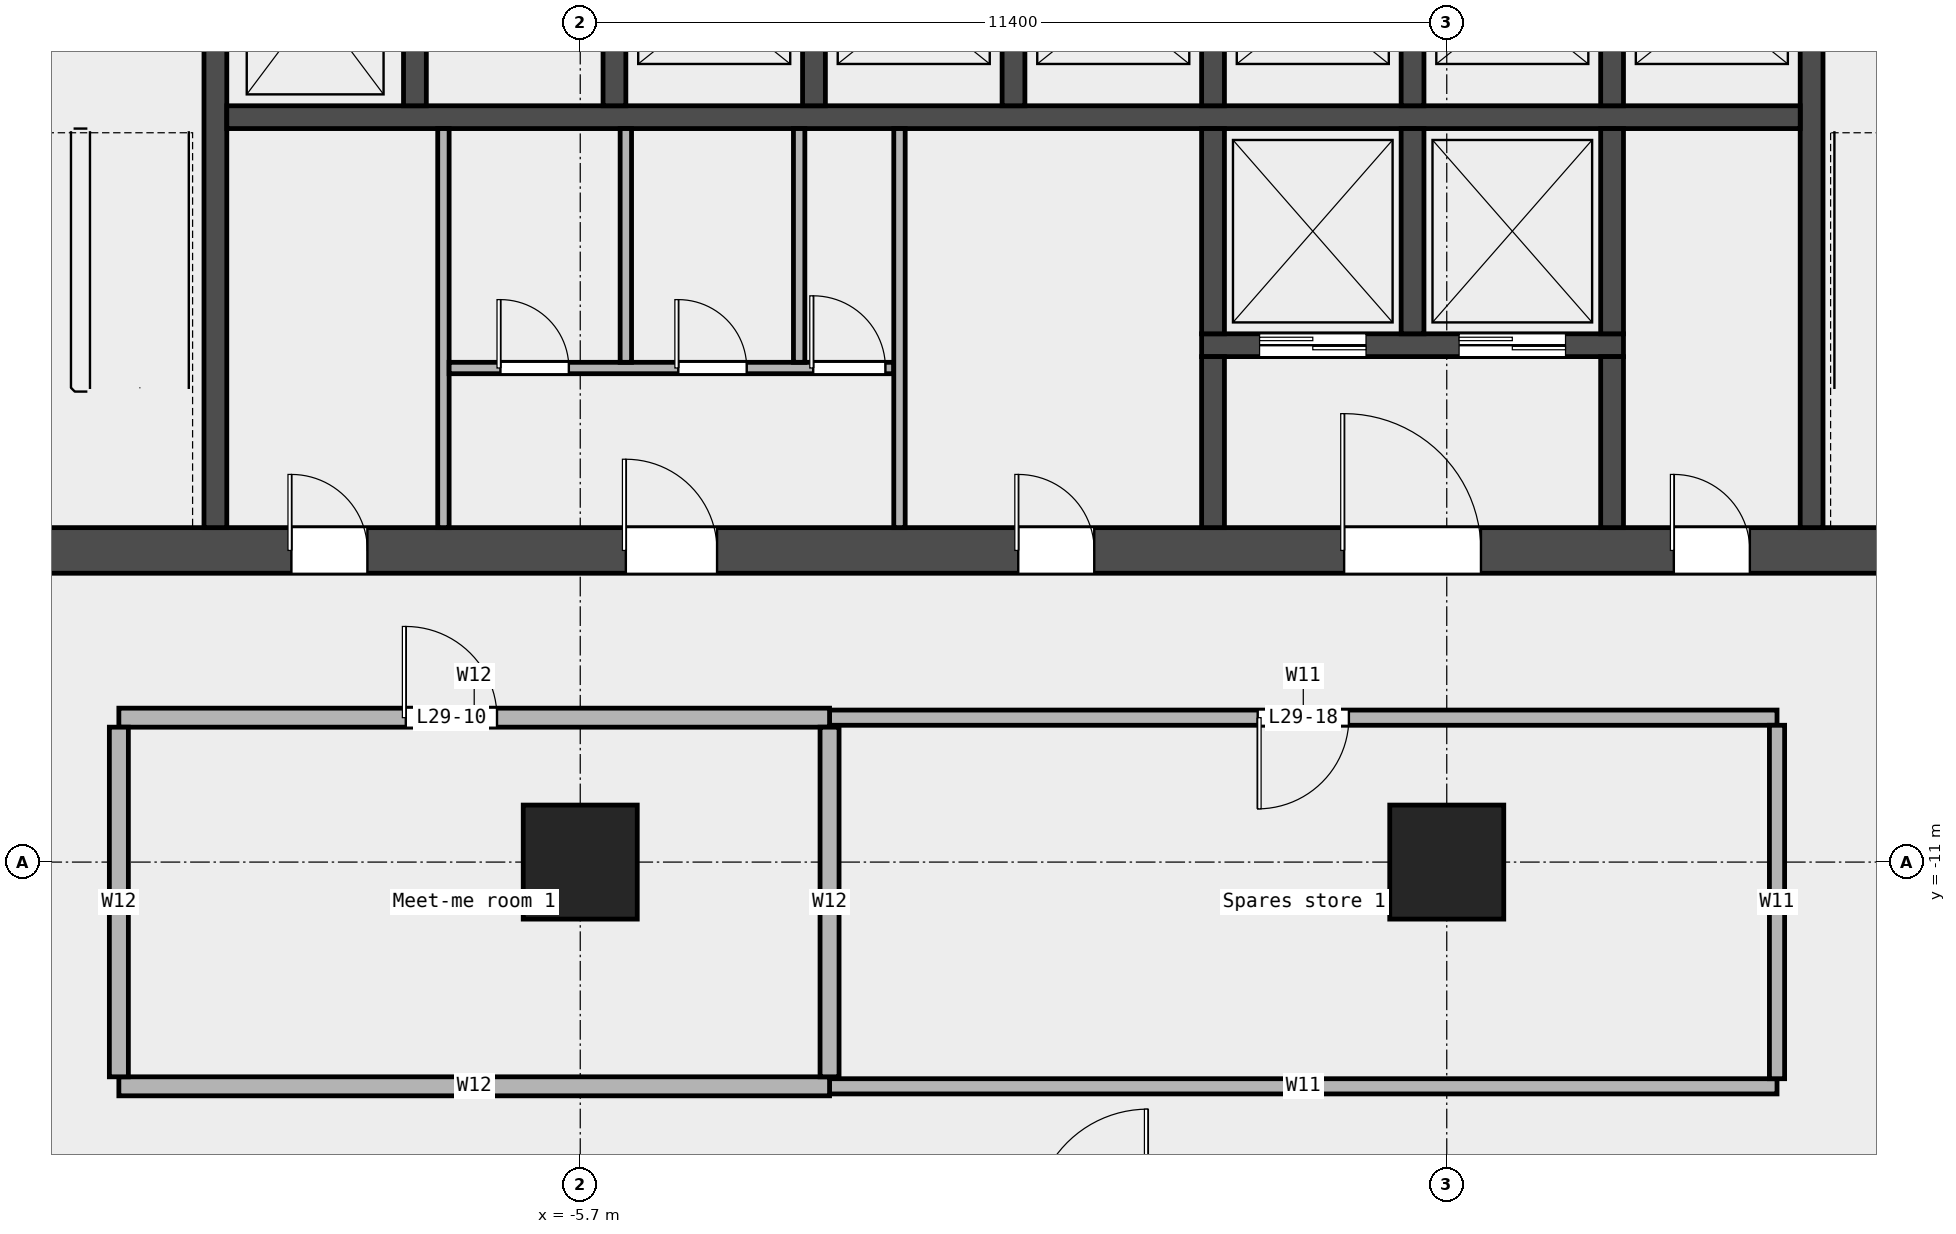
"""IFC4 building model, lengths in metres.
Left out: names, types, materials, properties, quantities, classifications, styles, units other than length and angle.
Written with IfcOpenShell. Run it as: python <this file> out.ifc"""

import sys

from ifc_helpers import new_model, si_unit, direction, frame, frame_2d, origin, origin_2d, place, context, subcontext, project, spatial, rectangle, extrude, element, fill, save


model = new_model("IFC4")
c1 = context("Model", 3, precision=1e-05, world=origin(), true_north=direction((0.0, 1.0)))
c2 = subcontext(c1, "Body", "Model", "MODEL_VIEW")
j1 = project(units=[si_unit("LENGTHUNIT", "METRE"), si_unit("PLANEANGLEUNIT", "RADIAN")], contexts=[c1])
p1 = place(None, origin())
s1 = spatial("IfcSite", under=j1, at=p1, CompositionType="ELEMENT")
p2 = place(p1, origin())
s2 = spatial("IfcBuilding", under=s1, at=p2, CompositionType="ELEMENT")
p3 = place(p2, frame((0.0, 0.0, 144.1)))
s3 = spatial("IfcBuildingStorey", under=s2, at=p3, CompositionType="ELEMENT", Elevation=144.1)
for number, where, z_axis, x_axis in (
    (1, (-5.7, -11.0, 0.0), (0.0, 0.0, 1.0), (1.0, 0.0, 0.0)),
    (2, (5.7, -11.0, 0.0), (0.0, 0.0, 1.0), (1.0, 0.0, 0.0)),
):
    element("IfcColumn", number, at=place(p3, frame(where, z_axis=z_axis, x_axis=x_axis)), inside=s3, PredefinedType="COLUMN", context=c2, shape_type="SweptSolid", body=[
        extrude(rectangle(XDim=1.5, YDim=1.5, at=origin_2d()), origin(), (0.0, 0.0, 1.0), 3.9),
    ])
p4 = place(p3, frame((-2.42, -13.95, 0.0), z_axis=(0.0, 0.0, 1.0), x_axis=(1.0, 0.0, 0.0)))
e3 = element("IfcWall", 3, at=p4, inside=s3, PredefinedType="PARTITIONING", context=c2, shape_type="SweptSolid", body=[
    extrude(rectangle(XDim=12.465, YDim=0.2, at=frame_2d((6.232, 0.0))), origin(), (0.0, 0.0, 1.0), 3.9),
])
p5 = place(p3, frame((-11.77, -13.95, 0.0), z_axis=(0.0, 0.0, 1.0), x_axis=(1.0, 0.0, 0.0)))
e4 = element("IfcWall", 4, at=p5, inside=s3, PredefinedType="PARTITIONING", context=c2, shape_type="SweptSolid", body=[
    extrude(rectangle(XDim=9.35, YDim=0.25, at=frame_2d((4.675, 0.0))), origin(), (0.0, 0.0, 1.0), 3.9),
])
p6 = place(p3, frame((-2.42, -9.1, 0.0), z_axis=(0.0, 0.0, 1.0), x_axis=(1.0, 0.0, 0.0)))
e5 = element("IfcWall", 5, at=p6, inside=s3, PredefinedType="PARTITIONING", context=c2, shape_type="SweptSolid", body=[
    extrude(rectangle(XDim=12.465, YDim=0.2, at=frame_2d((6.232, 0.0))), origin(), (0.0, 0.0, 1.0), 3.9),
])
p7 = place(p6, frame((5.633, 0.0, 0.0)))
e6 = element("IfcOpeningElement", 6, at=p7, cuts=e5, PredefinedType="OPENING", context=c2, shape_type="SweptSolid", body=[
    extrude(rectangle(XDim=1.2, YDim=2.1, at=frame_2d((0.6, 1.05))), frame((0.0, 0.112, 0.0), z_axis=(0.0, -1.0, 0.0), x_axis=(1.0, 0.0, 0.0)), (0.0, 0.0, 1.0), 0.224),
])
p8 = place(p3, frame((-11.77, -9.1, 0.0), z_axis=(0.0, 0.0, 1.0), x_axis=(1.0, 0.0, 0.0)))
e7 = element("IfcWall", 7, at=p8, inside=s3, PredefinedType="PARTITIONING", context=c2, shape_type="SweptSolid", body=[
    extrude(rectangle(XDim=9.35, YDim=0.25, at=frame_2d((4.675, 0.0))), origin(), (0.0, 0.0, 1.0), 3.9),
])
p9 = place(p8, frame((3.775, 0.0, 0.0)))
e8 = element("IfcOpeningElement", 8, at=p9, cuts=e7, PredefinedType="OPENING", context=c2, shape_type="SweptSolid", body=[
    extrude(rectangle(XDim=1.2, YDim=2.1, at=frame_2d((0.6, 1.05))), frame((0.0, 0.137, 0.0), z_axis=(0.0, -1.0, 0.0), x_axis=(1.0, 0.0, 0.0)), (0.0, 0.0, 1.0), 0.274),
])
for number, where, z_axis, x_axis in (
    (9, (-11.77, -13.825, 0.0), (0.0, 0.0, 1.0), (0.0, 1.0, 0.0)),
    (10, (-2.42, -13.825, 0.0), (0.0, 0.0, 1.0), (0.0, 1.0, 0.0)),
):
    element("IfcWall", number, at=place(p3, frame(where, z_axis=z_axis, x_axis=x_axis)), inside=s3, PredefinedType="PARTITIONING", context=c2, shape_type="SweptSolid", body=[
        extrude(rectangle(XDim=4.6, YDim=0.25, at=frame_2d((2.3, 0.0))), origin(), (0.0, 0.0, 1.0), 3.9),
    ])
p10 = place(p3, frame((10.045, -13.85, 0.0), z_axis=(0.0, 0.0, 1.0), x_axis=(0.0, 1.0, 0.0)))
e11 = element("IfcWall", 11, at=p10, inside=s3, PredefinedType="PARTITIONING", context=c2, shape_type="SweptSolid", body=[
    extrude(rectangle(XDim=4.65, YDim=0.2, at=frame_2d((2.325, 0.0))), origin(), (0.0, 0.0, 1.0), 3.9),
])
p11 = place(p3, frame((-14.4, -6.9, 0.0), z_axis=(0.0, 0.0, 1.0), x_axis=(1.0, 0.0, 0.0)))
e12 = element("IfcWall", 12, at=p11, inside=s3, PredefinedType="SHEAR", context=c2, shape_type="SweptSolid", body=[
    extrude(rectangle(XDim=28.8, YDim=0.6, at=frame_2d((14.4, 0.0))), origin(), (0.0, 0.0, 1.0), 4.2),
])
p12 = place(p11, frame((4.9, 0.0, 0.0)))
e13 = element("IfcOpeningElement", 13, at=p12, cuts=e12, PredefinedType="OPENING", context=c2, shape_type="SweptSolid", body=[
    extrude(rectangle(XDim=1.0, YDim=2.1, at=frame_2d((0.5, 1.05))), frame((0.0, 0.312, 0.0), z_axis=(0.0, -1.0, 0.0), x_axis=(1.0, 0.0, 0.0)), (0.0, 0.0, 1.0), 0.624),
])
p13 = place(p11, frame((9.3, 0.0, 0.0)))
e14 = element("IfcOpeningElement", 14, at=p13, cuts=e12, PredefinedType="OPENING", context=c2, shape_type="SweptSolid", body=[
    extrude(rectangle(XDim=1.2, YDim=2.1, at=frame_2d((0.6, 1.05))), frame((0.0, 0.312, 0.0), z_axis=(0.0, -1.0, 0.0), x_axis=(1.0, 0.0, 0.0)), (0.0, 0.0, 1.0), 0.624),
])
p14 = place(p11, frame((14.462, 0.0, 0.0)))
e15 = element("IfcOpeningElement", 15, at=p14, cuts=e12, PredefinedType="OPENING", context=c2, shape_type="SweptSolid", body=[
    extrude(rectangle(XDim=1.0, YDim=2.1, at=frame_2d((0.5, 1.05))), frame((0.0, 0.312, 0.0), z_axis=(0.0, -1.0, 0.0), x_axis=(1.0, 0.0, 0.0)), (0.0, 0.0, 1.0), 0.624),
])
p15 = place(p11, frame((18.75, 0.0, 0.0)))
e16 = element("IfcOpeningElement", 16, at=p15, cuts=e12, PredefinedType="OPENING", context=c2, shape_type="SweptSolid", body=[
    extrude(rectangle(XDim=1.8, YDim=2.1, at=frame_2d((0.9, 1.05))), frame((0.0, 0.312, 0.0), z_axis=(0.0, -1.0, 0.0), x_axis=(1.0, 0.0, 0.0)), (0.0, 0.0, 1.0), 0.624),
])
p16 = place(p11, frame((23.087, 0.0, 0.0)))
e17 = element("IfcOpeningElement", 17, at=p16, cuts=e12, PredefinedType="OPENING", context=c2, shape_type="SweptSolid", body=[
    extrude(rectangle(XDim=1.0, YDim=2.1, at=frame_2d((0.5, 1.05))), frame((0.0, 0.312, 0.0), z_axis=(0.0, -1.0, 0.0), x_axis=(1.0, 0.0, 0.0)), (0.0, 0.0, 1.0), 0.624),
])
for number, where, z_axis, x_axis in (
    (18, (-10.5, -6.6, 0.0), (0.0, 0.0, 1.0), (0.0, 1.0, 0.0)),
    (19, (10.5, -6.6, 0.0), (0.0, 0.0, 1.0), (0.0, 1.0, 0.0)),
):
    element("IfcWall", number, at=place(p3, frame(where, z_axis=z_axis, x_axis=x_axis)), inside=s3, PredefinedType="SHEAR", context=c2, shape_type="SweptSolid", body=[
        extrude(rectangle(XDim=8.55, YDim=0.3, at=frame_2d((4.275, 0.0))), origin(), (0.0, 0.0, 1.0), 4.2),
    ])
p17 = place(p3, frame((-10.35, -1.2, 0.0), z_axis=(0.0, 0.0, 1.0), x_axis=(1.0, 0.0, 0.0)))
e20 = element("IfcWall", 20, at=p17, inside=s3, PredefinedType="SOLIDWALL", context=c2, shape_type="SweptSolid", body=[
    extrude(rectangle(XDim=20.7, YDim=0.3, at=frame_2d((10.35, 0.0))), origin(), (0.0, 0.0, 1.0), 4.2),
])
for number, where, z_axis, x_axis in (
    (21, (-7.875, -1.05, 0.0), (0.0, 0.0, 1.0), (0.0, 1.0, 0.0)),
    (22, (-5.25, -1.05, 0.0), (0.0, 0.0, 1.0), (0.0, 1.0, 0.0)),
    (23, (-2.625, -1.05, 0.0), (0.0, 0.0, 1.0), (0.0, 1.0, 0.0)),
    (24, (0.0, -1.05, 0.0), (0.0, 0.0, 1.0), (0.0, 1.0, 0.0)),
    (25, (2.625, -1.05, 0.0), (0.0, 0.0, 1.0), (0.0, 1.0, 0.0)),
    (26, (5.25, -1.05, 0.0), (0.0, 0.0, 1.0), (0.0, 1.0, 0.0)),
    (27, (7.875, -1.05, 0.0), (0.0, 0.0, 1.0), (0.0, 1.0, 0.0)),
):
    element("IfcWall", number, at=place(p3, frame(where, z_axis=z_axis, x_axis=x_axis)), inside=s3, PredefinedType="SOLIDWALL", context=c2, shape_type="SweptSolid", body=[
        extrude(rectangle(XDim=2.7, YDim=0.3, at=frame_2d((1.35, 0.0))), origin(), (0.0, 0.0, 1.0), 4.2),
    ])
p18 = place(p3, frame((2.475, -4.2, 0.0), z_axis=(0.0, 0.0, 1.0), x_axis=(1.0, 0.0, 0.0)))
e28 = element("IfcWall", 28, at=p18, inside=s3, PredefinedType="SOLIDWALL", context=c2, shape_type="SweptSolid", body=[
    extrude(rectangle(XDim=5.55, YDim=0.3, at=frame_2d((2.775, 0.0))), origin(), (0.0, 0.0, 1.0), 4.2),
])
p19 = place(p18, frame((0.762, 0.0, 0.0)))
e29 = element("IfcOpeningElement", 29, at=p19, cuts=e28, PredefinedType="OPENING", context=c2, shape_type="SweptSolid", body=[
    extrude(rectangle(XDim=1.4, YDim=2.1, at=frame_2d((0.7, 1.05))), frame((0.0, 0.162, 0.0), z_axis=(0.0, -1.0, 0.0), x_axis=(1.0, 0.0, 0.0)), (0.0, 0.0, 1.0), 0.324),
])
p20 = place(p18, frame((3.387, 0.0, 0.0)))
e30 = element("IfcOpeningElement", 30, at=p20, cuts=e28, PredefinedType="OPENING", context=c2, shape_type="SweptSolid", body=[
    extrude(rectangle(XDim=1.4, YDim=2.1, at=frame_2d((0.7, 1.05))), frame((0.0, 0.162, 0.0), z_axis=(0.0, -1.0, 0.0), x_axis=(1.0, 0.0, 0.0)), (0.0, 0.0, 1.0), 0.324),
])
p21 = place(p3, frame((2.625, -4.05, 0.0), z_axis=(0.0, 0.0, 1.0), x_axis=(0.0, 1.0, 0.0)))
e31 = element("IfcWall", 31, at=p21, inside=s3, PredefinedType="SOLIDWALL", context=c2, shape_type="SweptSolid", body=[
    extrude(rectangle(XDim=2.7, YDim=0.3, at=frame_2d((1.35, 0.0))), origin(), (0.0, 0.0, 1.0), 4.2),
])
p22 = place(p3, frame((2.625, -6.6, 0.0), z_axis=(0.0, 0.0, 1.0), x_axis=(0.0, 1.0, 0.0)))
e32 = element("IfcWall", 32, at=p22, inside=s3, PredefinedType="SOLIDWALL", context=c2, shape_type="SweptSolid", body=[
    extrude(rectangle(XDim=2.25, YDim=0.3, at=frame_2d((1.125, 0.0))), origin(), (0.0, 0.0, 1.0), 4.2),
])
for number, where, z_axis, x_axis in (
    (33, (5.25, -4.05, 0.0), (0.0, 0.0, 1.0), (0.0, 1.0, 0.0)),
    (34, (7.875, -4.05, 0.0), (0.0, 0.0, 1.0), (0.0, 1.0, 0.0)),
):
    element("IfcWall", number, at=place(p3, frame(where, z_axis=z_axis, x_axis=x_axis)), inside=s3, PredefinedType="SOLIDWALL", context=c2, shape_type="SweptSolid", body=[
        extrude(rectangle(XDim=2.7, YDim=0.3, at=frame_2d((1.35, 0.0))), origin(), (0.0, 0.0, 1.0), 4.2),
    ])
p23 = place(p3, frame((7.875, -6.6, 0.0), z_axis=(0.0, 0.0, 1.0), x_axis=(0.0, 1.0, 0.0)))
e35 = element("IfcWall", 35, at=p23, inside=s3, PredefinedType="SOLIDWALL", context=c2, shape_type="SweptSolid", body=[
    extrude(rectangle(XDim=2.25, YDim=0.3, at=frame_2d((1.125, 0.0))), origin(), (0.0, 0.0, 1.0), 4.2),
])
p24 = place(p3, frame((-7.5, -6.6, 0.0), z_axis=(0.0, 0.0, 1.0), x_axis=(0.0, 1.0, 0.0)))
e36 = element("IfcWall", 36, at=p24, inside=s3, PredefinedType="PARTITIONING", context=c2, shape_type="SweptSolid", body=[
    extrude(rectangle(XDim=5.25, YDim=0.15, at=frame_2d((2.625, 0.0))), origin(), (0.0, 0.0, 1.0), 4.2),
])
p25 = place(p3, frame((-7.425, -4.5, 0.0), z_axis=(0.0, 0.0, 1.0), x_axis=(1.0, 0.0, 0.0)))
e37 = element("IfcWall", 37, at=p25, inside=s3, PredefinedType="PARTITIONING", context=c2, shape_type="SweptSolid", body=[
    extrude(rectangle(XDim=5.85, YDim=0.15, at=frame_2d((2.925, 0.0))), origin(), (0.0, 0.0, 1.0), 4.2),
])
p26 = place(p25, frame((0.675, 0.0, 0.0)))
e38 = element("IfcOpeningElement", 38, at=p26, cuts=e37, PredefinedType="OPENING", context=c2, shape_type="SweptSolid", body=[
    extrude(rectangle(XDim=0.9, YDim=2.1, at=frame_2d((0.45, 1.05))), frame((0.0, 0.087, 0.0), z_axis=(0.0, -1.0, 0.0), x_axis=(1.0, 0.0, 0.0)), (0.0, 0.0, 1.0), 0.174),
])
p27 = place(p25, frame((3.015, 0.0, 0.0)))
e39 = element("IfcOpeningElement", 39, at=p27, cuts=e37, PredefinedType="OPENING", context=c2, shape_type="SweptSolid", body=[
    extrude(rectangle(XDim=0.9, YDim=2.1, at=frame_2d((0.45, 1.05))), frame((0.0, 0.087, 0.0), z_axis=(0.0, -1.0, 0.0), x_axis=(1.0, 0.0, 0.0)), (0.0, 0.0, 1.0), 0.174),
])
p28 = place(p25, frame((4.79, 0.0, 0.0)))
e40 = element("IfcOpeningElement", 40, at=p28, cuts=e37, PredefinedType="OPENING", context=c2, shape_type="SweptSolid", body=[
    extrude(rectangle(XDim=0.95, YDim=2.1, at=frame_2d((0.475, 1.05))), frame((0.0, 0.087, 0.0), z_axis=(0.0, -1.0, 0.0), x_axis=(1.0, 0.0, 0.0)), (0.0, 0.0, 1.0), 0.174),
])
for number, where, z_axis, x_axis in (
    (41, (-5.1, -4.425, 0.0), (0.0, 0.0, 1.0), (0.0, 1.0, 0.0)),
    (42, (-2.82, -4.425, 0.0), (0.0, 0.0, 1.0), (0.0, 1.0, 0.0)),
):
    element("IfcWall", number, at=place(p3, frame(where, z_axis=z_axis, x_axis=x_axis)), inside=s3, PredefinedType="PARTITIONING", context=c2, shape_type="SweptSolid", body=[
        extrude(rectangle(XDim=3.075, YDim=0.15, at=frame_2d((1.538, 0.0))), origin(), (0.0, 0.0, 1.0), 4.2),
    ])
p29 = place(p3, frame((-1.5, -6.6, 0.0), z_axis=(0.0, 0.0, 1.0), x_axis=(0.0, 1.0, 0.0)))
e43 = element("IfcWall", 43, at=p29, inside=s3, PredefinedType="PARTITIONING", context=c2, shape_type="SweptSolid", body=[
    extrude(rectangle(XDim=5.25, YDim=0.15, at=frame_2d((2.625, 0.0))), origin(), (0.0, 0.0, 1.0), 4.2),
])
p30 = place(p9, origin())
e44 = element("IfcDoor", 44, at=p30, inside=s3, OperationType="SINGLE_SWING_LEFT", PredefinedType="DOOR", context=c2, shape_type="SweptSolid", body=[
    extrude(rectangle(XDim=1.2, YDim=2.1, at=frame_2d((0.6, 1.05))), frame((0.0, 0.025, 0.0), z_axis=(0.0, -1.0, 0.0), x_axis=(1.0, 0.0, 0.0)), (0.0, 0.0, 1.0), 0.05),
])
fill(e8, e44)
p31 = place(p7, origin())
e45 = element("IfcDoor", 45, at=p31, inside=s3, OperationType="SINGLE_SWING_RIGHT", PredefinedType="DOOR", context=c2, shape_type="SweptSolid", body=[
    extrude(rectangle(XDim=1.2, YDim=2.1, at=frame_2d((0.6, 1.05))), frame((0.0, 0.025, 0.0), z_axis=(0.0, -1.0, 0.0), x_axis=(1.0, 0.0, 0.0)), (0.0, 0.0, 1.0), 0.05),
])
fill(e6, e45)
p32 = place(p19, origin())
e46 = element("IfcDoor", 46, at=p32, inside=s3, OperationType="DOUBLE_DOOR_SLIDING", PredefinedType="DOOR", context=c2, shape_type="SweptSolid", body=[
    extrude(rectangle(XDim=1.4, YDim=2.1, at=frame_2d((0.7, 1.05))), frame((0.0, 0.025, 0.0), z_axis=(0.0, -1.0, 0.0), x_axis=(1.0, 0.0, 0.0)), (0.0, 0.0, 1.0), 0.05),
])
fill(e29, e46)
p33 = place(p20, origin())
e47 = element("IfcDoor", 47, at=p33, inside=s3, OperationType="DOUBLE_DOOR_SLIDING", PredefinedType="DOOR", context=c2, shape_type="SweptSolid", body=[
    extrude(rectangle(XDim=1.4, YDim=2.1, at=frame_2d((0.7, 1.05))), frame((0.0, 0.025, 0.0), z_axis=(0.0, -1.0, 0.0), x_axis=(1.0, 0.0, 0.0)), (0.0, 0.0, 1.0), 0.05),
])
fill(e30, e47)
p34 = place(p12, origin())
e48 = element("IfcDoor", 48, at=p34, inside=s3, OperationType="SINGLE_SWING_LEFT", PredefinedType="DOOR", context=c2, shape_type="SweptSolid", body=[
    extrude(rectangle(XDim=1.0, YDim=2.1, at=frame_2d((0.5, 1.05))), frame((0.0, 0.025, 0.0), z_axis=(0.0, -1.0, 0.0), x_axis=(1.0, 0.0, 0.0)), (0.0, 0.0, 1.0), 0.05),
])
fill(e13, e48)
p35 = place(p13, origin())
e49 = element("IfcDoor", 49, at=p35, inside=s3, OperationType="SINGLE_SWING_LEFT", PredefinedType="DOOR", context=c2, shape_type="SweptSolid", body=[
    extrude(rectangle(XDim=1.2, YDim=2.1, at=frame_2d((0.6, 1.05))), frame((0.0, 0.025, 0.0), z_axis=(0.0, -1.0, 0.0), x_axis=(1.0, 0.0, 0.0)), (0.0, 0.0, 1.0), 0.05),
])
fill(e14, e49)
p36 = place(p26, origin())
e50 = element("IfcDoor", 50, at=p36, inside=s3, OperationType="SINGLE_SWING_LEFT", PredefinedType="DOOR", context=c2, shape_type="SweptSolid", body=[
    extrude(rectangle(XDim=0.9, YDim=2.1, at=frame_2d((0.45, 1.05))), frame((0.0, 0.025, 0.0), z_axis=(0.0, -1.0, 0.0), x_axis=(1.0, 0.0, 0.0)), (0.0, 0.0, 1.0), 0.05),
])
fill(e38, e50)
p37 = place(p27, origin())
e51 = element("IfcDoor", 51, at=p37, inside=s3, OperationType="SINGLE_SWING_LEFT", PredefinedType="DOOR", context=c2, shape_type="SweptSolid", body=[
    extrude(rectangle(XDim=0.9, YDim=2.1, at=frame_2d((0.45, 1.05))), frame((0.0, 0.025, 0.0), z_axis=(0.0, -1.0, 0.0), x_axis=(1.0, 0.0, 0.0)), (0.0, 0.0, 1.0), 0.05),
])
fill(e39, e51)
p38 = place(p28, origin())
e52 = element("IfcDoor", 52, at=p38, inside=s3, OperationType="SINGLE_SWING_LEFT", PredefinedType="DOOR", context=c2, shape_type="SweptSolid", body=[
    extrude(rectangle(XDim=0.95, YDim=2.1, at=frame_2d((0.475, 1.05))), frame((0.0, 0.025, 0.0), z_axis=(0.0, -1.0, 0.0), x_axis=(1.0, 0.0, 0.0)), (0.0, 0.0, 1.0), 0.05),
])
fill(e40, e52)
p39 = place(p14, origin())
e53 = element("IfcDoor", 53, at=p39, inside=s3, OperationType="SINGLE_SWING_LEFT", PredefinedType="DOOR", context=c2, shape_type="SweptSolid", body=[
    extrude(rectangle(XDim=1.0, YDim=2.1, at=frame_2d((0.5, 1.05))), frame((0.0, 0.025, 0.0), z_axis=(0.0, -1.0, 0.0), x_axis=(1.0, 0.0, 0.0)), (0.0, 0.0, 1.0), 0.05),
])
fill(e15, e53)
p40 = place(p15, origin())
e54 = element("IfcDoor", 54, at=p40, inside=s3, OperationType="DOUBLE_DOOR_SINGLE_SWING", PredefinedType="DOOR", context=c2, shape_type="SweptSolid", body=[
    extrude(rectangle(XDim=1.8, YDim=2.1, at=frame_2d((0.9, 1.05))), frame((0.0, 0.025, 0.0), z_axis=(0.0, -1.0, 0.0), x_axis=(1.0, 0.0, 0.0)), (0.0, 0.0, 1.0), 0.05),
])
fill(e16, e54)
p41 = place(p16, origin())
e55 = element("IfcDoor", 55, at=p41, inside=s3, OperationType="SINGLE_SWING_LEFT", PredefinedType="DOOR", context=c2, shape_type="SweptSolid", body=[
    extrude(rectangle(XDim=1.0, YDim=2.1, at=frame_2d((0.5, 1.05))), frame((0.0, 0.025, 0.0), z_axis=(0.0, -1.0, 0.0), x_axis=(1.0, 0.0, 0.0)), (0.0, 0.0, 1.0), 0.05),
])
fill(e17, e55)
save(model, sys.argv[1])
